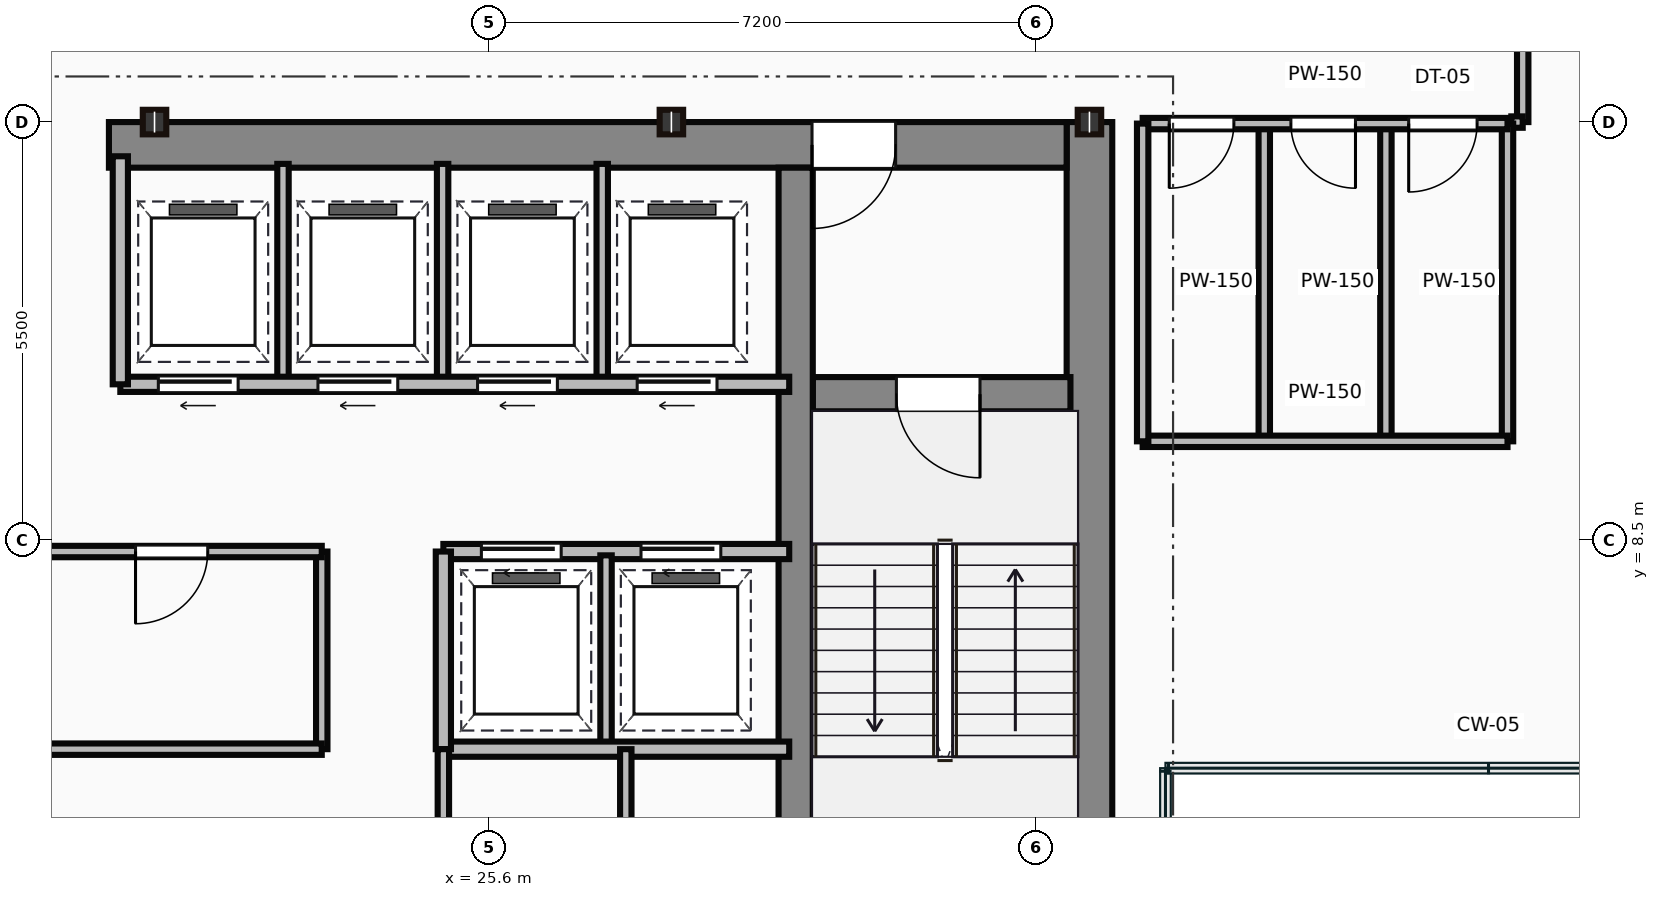
"""IFC4 building model, lengths in metres.
Left out: names, types, materials, properties, quantities, classifications, styles, units other than length and angle.
Written with IfcOpenShell. Run it as: python <this file> out.ifc"""

import sys

from ifc_helpers import new_model, si_unit, direction, frame, frame_2d, origin, origin_2d, place, context, subcontext, project, spatial, rectangle, i_section, extrude, source, transform, mapped, element, fill, save


model = new_model("IFC4")
c1 = context("Model", 3, precision=1e-05, world=origin(), true_north=direction((0.0, 1.0)))
c2 = subcontext(c1, "Body", "Model", "MODEL_VIEW")
j1 = project(units=[si_unit("LENGTHUNIT", "METRE"), si_unit("PLANEANGLEUNIT", "RADIAN")], contexts=[c1])
p1 = place(None, origin())
s1 = spatial("IfcSite", under=j1, at=p1, CompositionType="ELEMENT")
p2 = place(p1, origin())
s2 = spatial("IfcBuilding", under=s1, at=p2, CompositionType="ELEMENT")
p3 = place(p2, frame((0.0, 0.0, 240.55)))
s3 = spatial("IfcBuildingStorey", under=s2, at=p3, CompositionType="ELEMENT", Elevation=240.55)
m1 = source(origin(), c2, "Body", "SweptSolid", [
    extrude(rectangle(XDim=13.1, YDim=0.6, at=frame_2d((6.55, 0.0))), origin(), (0.0, 0.0, 1.0), 3.65),
])
p4 = place(p3, frame((33.5, 0.9, 0.0), z_axis=(0.0, 0.0, 1.0), x_axis=(0.0, 1.0, 0.0)))
e1 = element("IfcWall", 1, at=p4, inside=s3, PredefinedType="SHEAR", context=c2, shape_type="MappedRepresentation", body=[
    mapped(m1, transform((0.0, 0.0, 0.0))),
])
m2 = source(origin(), c2, "Body", "SweptSolid", [
    extrude(rectangle(XDim=12.6, YDim=0.6, at=frame_2d((6.3, 0.0))), origin(), (0.0, 0.0, 1.0), 3.65),
])
p5 = place(p3, frame((20.6, 13.7, 0.0), z_axis=(0.0, 0.0, 1.0), x_axis=(1.0, 0.0, 0.0)))
e2 = element("IfcWall", 2, at=p5, inside=s3, PredefinedType="SHEAR", context=c2, shape_type="MappedRepresentation", body=[
    mapped(m2, transform((0.0, 0.0, 0.0))),
])
p6 = place(p5, frame((9.25, 0.0, 0.0)))
e3 = element("IfcOpeningElement", 3, at=p6, cuts=e2, PredefinedType="OPENING", context=c2, shape_type="SweptSolid", body=[
    extrude(rectangle(XDim=1.1, YDim=2.15, at=frame_2d((0.55, 1.075))), frame((0.0, 0.31, 0.0), z_axis=(0.0, -1.0, 0.0), x_axis=(1.0, 0.0, 0.0)), (0.0, 0.0, 1.0), 0.62),
])
m3 = source(origin(), c2, "Body", "SweptSolid", [
    extrude(rectangle(XDim=12.5, YDim=0.45, at=frame_2d((6.25, 0.0))), origin(), (0.0, 0.0, 1.0), 3.65),
])
p7 = place(p3, frame((29.635, 0.9, 0.0), z_axis=(0.0, 0.0, 1.0), x_axis=(0.0, 1.0, 0.0)))
e4 = element("IfcWall", 4, at=p7, inside=s3, PredefinedType="SHEAR", context=c2, shape_type="MappedRepresentation", body=[
    mapped(m3, transform((0.0, 0.0, 0.0))),
])
m4 = source(origin(), c2, "Body", "SweptSolid", [
    extrude(rectangle(XDim=3.39, YDim=0.45, at=frame_2d((1.695, 0.0))), origin(), (0.0, 0.0, 1.0), 3.65),
])
p8 = place(p3, frame((29.86, 10.42, 0.0), z_axis=(0.0, 0.0, 1.0), x_axis=(1.0, 0.0, 0.0)))
e5 = element("IfcWall", 5, at=p8, inside=s3, PredefinedType="SHEAR", context=c2, shape_type="MappedRepresentation", body=[
    mapped(m4, transform((0.0, 0.0, 0.0))),
])
p9 = place(p8, frame((1.1, 0.0, 0.0)))
e6 = element("IfcOpeningElement", 6, at=p9, cuts=e5, PredefinedType="OPENING", context=c2, shape_type="SweptSolid", body=[
    extrude(rectangle(XDim=1.1, YDim=2.15, at=frame_2d((0.55, 1.075))), frame((0.0, 0.235, 0.0), z_axis=(0.0, -1.0, 0.0), x_axis=(1.0, 0.0, 0.0)), (0.0, 0.0, 1.0), 0.47),
])
m5 = source(origin(), c2, "Body", "SweptSolid", [
    extrude(i_section(OverallWidth=0.309, OverallDepth=0.323, WebThickness=0.014, FlangeThickness=0.023, at=origin_2d()), origin(), (0.0, 0.0, 1.0), 3.65),
])
for number, where, z_axis, x_axis in (
    (7, (21.2, 14.0, 0.0), (0.0, 0.0, 1.0), (1.0, 0.0, 0.0)),
    (8, (28.0, 14.0, 0.0), (0.0, 0.0, 1.0), (1.0, 0.0, 0.0)),
    (9, (33.5, 14.0, 0.0), (0.0, 0.0, 1.0), (1.0, 0.0, 0.0)),
):
    element("IfcColumn", number, at=place(p3, frame(where, z_axis=z_axis, x_axis=x_axis)), inside=s3, PredefinedType="COLUMN", context=c2, shape_type="MappedRepresentation", body=[
        mapped(m5, transform((0.0, 0.0, 0.0))),
    ])
m6 = source(origin(), c2, "Body", "SweptSolid", [
    extrude(rectangle(XDim=11.85, YDim=0.15, at=frame_2d((5.925, 0.0))), origin(), (0.0, 0.0, 1.0), 3.4),
])
p10 = place(p3, frame((11.55, 5.75, 0.0), z_axis=(0.0, 0.0, 1.0), x_axis=(1.0, 0.0, 0.0)))
e10 = element("IfcWall", 10, at=p10, inside=s3, PredefinedType="PARTITIONING", context=c2, shape_type="MappedRepresentation", body=[
    mapped(m6, transform((0.0, 0.0, 0.0))),
])
p11 = place(p3, frame((11.55, 8.35, 0.0), z_axis=(0.0, 0.0, 1.0), x_axis=(1.0, 0.0, 0.0)))
e11 = element("IfcWall", 11, at=p11, inside=s3, PredefinedType="PARTITIONING", context=c2, shape_type="MappedRepresentation", body=[
    mapped(m6, transform((0.0, 0.0, 0.0))),
])
p12 = place(p11, frame((1.1, 0.0, 0.0)))
e12 = element("IfcOpeningElement", 12, at=p12, cuts=e11, PredefinedType="OPENING", context=c2, shape_type="SweptSolid", body=[
    extrude(rectangle(XDim=0.95, YDim=2.15, at=frame_2d((0.475, 1.075))), frame((0.0, 0.085, 0.0), z_axis=(0.0, -1.0, 0.0), x_axis=(1.0, 0.0, 0.0)), (0.0, 0.0, 1.0), 0.17),
])
p13 = place(p11, frame((9.4, 0.0, 0.0)))
e13 = element("IfcOpeningElement", 13, at=p13, cuts=e11, PredefinedType="OPENING", context=c2, shape_type="SweptSolid", body=[
    extrude(rectangle(XDim=0.95, YDim=2.15, at=frame_2d((0.475, 1.075))), frame((0.0, 0.085, 0.0), z_axis=(0.0, -1.0, 0.0), x_axis=(1.0, 0.0, 0.0)), (0.0, 0.0, 1.0), 0.17),
])
m7 = source(origin(), c2, "Body", "SweptSolid", [
    extrude(rectangle(XDim=2.6, YDim=0.15, at=frame_2d((1.3, 0.0))), origin(), (0.0, 0.0, 1.0), 3.4),
])
p14 = place(p3, frame((23.4, 5.75, 0.0), z_axis=(0.0, 0.0, 1.0), x_axis=(0.0, 1.0, 0.0)))
e14 = element("IfcWall", 14, at=p14, inside=s3, PredefinedType="PARTITIONING", context=c2, shape_type="MappedRepresentation", body=[
    mapped(m7, transform((0.0, 0.0, 0.0))),
])
m8 = source(origin(), c2, "Body", "SweptSolid", [
    extrude(rectangle(XDim=8.8, YDim=0.2, at=frame_2d((4.4, 0.0))), origin(), (0.0, 0.0, 1.0), 3.4),
])
p15 = place(p3, frame((20.75, 10.55, 0.0), z_axis=(0.0, 0.0, 1.0), x_axis=(1.0, 0.0, 0.0)))
e15 = element("IfcWall", 15, at=p15, inside=s3, PredefinedType="PARTITIONING", context=c2, shape_type="MappedRepresentation", body=[
    mapped(m8, transform((0.0, 0.0, 0.0))),
])
p16 = place(p15, frame((0.5, 0.0, 0.0)))
e16 = element("IfcOpeningElement", 16, at=p16, cuts=e15, PredefinedType="OPENING", context=c2, shape_type="SweptSolid", body=[
    extrude(rectangle(XDim=1.05, YDim=2.15, at=frame_2d((0.525, 1.075))), frame((0.0, 0.11, 0.0), z_axis=(0.0, -1.0, 0.0), x_axis=(1.0, 0.0, 0.0)), (0.0, 0.0, 1.0), 0.22),
])
p17 = place(p15, frame((2.6, 0.0, 0.0)))
e17 = element("IfcOpeningElement", 17, at=p17, cuts=e15, PredefinedType="OPENING", context=c2, shape_type="SweptSolid", body=[
    extrude(rectangle(XDim=1.05, YDim=2.15, at=frame_2d((0.525, 1.075))), frame((0.0, 0.11, 0.0), z_axis=(0.0, -1.0, 0.0), x_axis=(1.0, 0.0, 0.0)), (0.0, 0.0, 1.0), 0.22),
])
p18 = place(p15, frame((4.7, 0.0, 0.0)))
e18 = element("IfcOpeningElement", 18, at=p18, cuts=e15, PredefinedType="OPENING", context=c2, shape_type="SweptSolid", body=[
    extrude(rectangle(XDim=1.05, YDim=2.15, at=frame_2d((0.525, 1.075))), frame((0.0, 0.11, 0.0), z_axis=(0.0, -1.0, 0.0), x_axis=(1.0, 0.0, 0.0)), (0.0, 0.0, 1.0), 0.22),
])
p19 = place(p15, frame((6.8, 0.0, 0.0)))
e19 = element("IfcOpeningElement", 19, at=p19, cuts=e15, PredefinedType="OPENING", context=c2, shape_type="SweptSolid", body=[
    extrude(rectangle(XDim=1.05, YDim=2.15, at=frame_2d((0.525, 1.075))), frame((0.0, 0.11, 0.0), z_axis=(0.0, -1.0, 0.0), x_axis=(1.0, 0.0, 0.0)), (0.0, 0.0, 1.0), 0.22),
])
m9 = source(origin(), c2, "Body", "SweptSolid", [
    extrude(rectangle(XDim=3.0, YDim=0.2, at=frame_2d((1.5, 0.0))), origin(), (0.0, 0.0, 1.0), 3.4),
])
p20 = place(p3, frame((20.75, 10.55, 0.0), z_axis=(0.0, 0.0, 1.0), x_axis=(0.0, 1.0, 0.0)))
e20 = element("IfcWall", 20, at=p20, inside=s3, PredefinedType="PARTITIONING", context=c2, shape_type="MappedRepresentation", body=[
    mapped(m9, transform((0.0, 0.0, 0.0))),
])
m10 = source(origin(), c2, "Body", "SweptSolid", [
    extrude(rectangle(XDim=2.85, YDim=0.15, at=frame_2d((1.425, 0.0))), origin(), (0.0, 0.0, 1.0), 3.4),
])
for number, where, z_axis, x_axis in (
    (21, (22.89, 10.6, 0.0), (0.0, 0.0, 1.0), (0.0, 1.0, 0.0)),
    (22, (24.99, 10.6, 0.0), (0.0, 0.0, 1.0), (0.0, 1.0, 0.0)),
    (23, (27.09, 10.6, 0.0), (0.0, 0.0, 1.0), (0.0, 1.0, 0.0)),
):
    element("IfcWall", number, at=place(p3, frame(where, z_axis=z_axis, x_axis=x_axis)), inside=s3, PredefinedType="PARTITIONING", context=c2, shape_type="MappedRepresentation", body=[
        mapped(m10, transform((0.0, 0.0, 0.0))),
    ])
m11 = source(origin(), c2, "Body", "SweptSolid", [
    extrude(rectangle(XDim=4.55, YDim=0.2, at=frame_2d((2.275, 0.0))), origin(), (0.0, 0.0, 1.0), 3.4),
])
p21 = place(p3, frame((25.0, 8.35, 0.0), z_axis=(0.0, 0.0, 1.0), x_axis=(1.0, 0.0, 0.0)))
e24 = element("IfcWall", 24, at=p21, inside=s3, PredefinedType="PARTITIONING", context=c2, shape_type="MappedRepresentation", body=[
    mapped(m11, transform((0.0, 0.0, 0.0))),
])
p22 = place(p21, frame((0.5, 0.0, 0.0)))
e25 = element("IfcOpeningElement", 25, at=p22, cuts=e24, PredefinedType="OPENING", context=c2, shape_type="SweptSolid", body=[
    extrude(rectangle(XDim=1.05, YDim=2.15, at=frame_2d((0.525, 1.075))), frame((0.0, 0.11, 0.0), z_axis=(0.0, -1.0, 0.0), x_axis=(1.0, 0.0, 0.0)), (0.0, 0.0, 1.0), 0.22),
])
p23 = place(p21, frame((2.6, 0.0, 0.0)))
e26 = element("IfcOpeningElement", 26, at=p23, cuts=e24, PredefinedType="OPENING", context=c2, shape_type="SweptSolid", body=[
    extrude(rectangle(XDim=1.05, YDim=2.15, at=frame_2d((0.525, 1.075))), frame((0.0, 0.11, 0.0), z_axis=(0.0, -1.0, 0.0), x_axis=(1.0, 0.0, 0.0)), (0.0, 0.0, 1.0), 0.22),
])
p24 = place(p3, frame((25.0, 5.75, 0.0), z_axis=(0.0, 0.0, 1.0), x_axis=(1.0, 0.0, 0.0)))
e27 = element("IfcWall", 27, at=p24, inside=s3, PredefinedType="PARTITIONING", context=c2, shape_type="MappedRepresentation", body=[
    mapped(m11, transform((0.0, 0.0, 0.0))),
])
m12 = source(origin(), c2, "Body", "SweptSolid", [
    extrude(rectangle(XDim=2.6, YDim=0.2, at=frame_2d((1.3, 0.0))), origin(), (0.0, 0.0, 1.0), 3.4),
])
p25 = place(p3, frame((25.0, 5.75, 0.0), z_axis=(0.0, 0.0, 1.0), x_axis=(0.0, 1.0, 0.0)))
e28 = element("IfcWall", 28, at=p25, inside=s3, PredefinedType="PARTITIONING", context=c2, shape_type="MappedRepresentation", body=[
    mapped(m12, transform((0.0, 0.0, 0.0))),
])
m13 = source(origin(), c2, "Body", "SweptSolid", [
    extrude(rectangle(XDim=2.5, YDim=0.15, at=frame_2d((1.25, 0.0))), origin(), (0.0, 0.0, 1.0), 3.4),
])
p26 = place(p3, frame((27.14, 5.8, 0.0), z_axis=(0.0, 0.0, 1.0), x_axis=(0.0, 1.0, 0.0)))
e29 = element("IfcWall", 29, at=p26, inside=s3, PredefinedType="PARTITIONING", context=c2, shape_type="MappedRepresentation", body=[
    mapped(m13, transform((0.0, 0.0, 0.0))),
])
m14 = source(origin(), c2, "Body", "SweptSolid", [
    extrude(rectangle(XDim=4.9, YDim=0.15, at=frame_2d((2.45, 0.0))), origin(), (0.0, 0.0, 1.0), 3.4),
])
p27 = place(p3, frame((25.0, 0.85, 0.0), z_axis=(0.0, 0.0, 1.0), x_axis=(0.0, 1.0, 0.0)))
e30 = element("IfcWall", 30, at=p27, inside=s3, PredefinedType="PARTITIONING", context=c2, shape_type="MappedRepresentation", body=[
    mapped(m14, transform((0.0, 0.0, 0.0))),
])
p28 = place(p27, frame((2.5, 0.0, 0.0)))
e31 = element("IfcOpeningElement", 31, at=p28, cuts=e30, PredefinedType="OPENING", context=c2, shape_type="SweptSolid", body=[
    extrude(rectangle(XDim=0.95, YDim=2.15, at=frame_2d((0.475, 1.075))), frame((0.0, 0.085, 0.0), z_axis=(0.0, -1.0, 0.0), x_axis=(1.0, 0.0, 0.0)), (0.0, 0.0, 1.0), 0.17),
])
m15 = source(origin(), c2, "Body", "SweptSolid", [
    extrude(rectangle(XDim=3.4, YDim=0.15, at=frame_2d((1.7, 0.0))), origin(), (0.0, 0.0, 1.0), 3.4),
])
p29 = place(p3, frame((27.4, 2.35, 0.0), z_axis=(0.0, 0.0, 1.0), x_axis=(0.0, 1.0, 0.0)))
e32 = element("IfcWall", 32, at=p29, inside=s3, PredefinedType="PARTITIONING", context=c2, shape_type="MappedRepresentation", body=[
    mapped(m15, transform((0.0, 0.0, 0.0))),
])
p30 = place(p29, frame((1.1, 0.0, 0.0)))
e33 = element("IfcOpeningElement", 33, at=p30, cuts=e32, PredefinedType="OPENING", context=c2, shape_type="SweptSolid", body=[
    extrude(rectangle(XDim=0.85, YDim=2.1, at=frame_2d((0.425, 1.05))), frame((0.0, 0.085, 0.0), z_axis=(0.0, -1.0, 0.0), x_axis=(1.0, 0.0, 0.0)), (0.0, 0.0, 1.0), 0.17),
])
m16 = source(origin(), c2, "Body", "SweptSolid", [
    extrude(rectangle(XDim=4.8, YDim=0.15, at=frame_2d((2.4, 0.0))), origin(), (0.0, 0.0, 1.0), 2.787),
])
p31 = place(p3, frame((34.2, 13.98, 0.0), z_axis=(0.0, 0.0, 1.0), x_axis=(1.0, 0.0, 0.0)))
e34 = element("IfcWall", 34, at=p31, inside=s3, PredefinedType="PARTITIONING", context=c2, shape_type="MappedRepresentation", body=[
    mapped(m16, transform((0.0, 0.0, 0.0))),
])
p32 = place(p31, frame((0.35, 0.0, 0.0)))
e35 = element("IfcOpeningElement", 35, at=p32, cuts=e34, PredefinedType="OPENING", context=c2, shape_type="SweptSolid", body=[
    extrude(rectangle(XDim=0.85, YDim=2.1, at=frame_2d((0.425, 1.05))), frame((0.0, 0.085, 0.0), z_axis=(0.0, -1.0, 0.0), x_axis=(1.0, 0.0, 0.0)), (0.0, 0.0, 1.0), 0.17),
])
p33 = place(p31, frame((1.95, 0.0, 0.0)))
e36 = element("IfcOpeningElement", 36, at=p33, cuts=e34, PredefinedType="OPENING", context=c2, shape_type="SweptSolid", body=[
    extrude(rectangle(XDim=0.85, YDim=2.1, at=frame_2d((0.425, 1.05))), frame((0.0, 0.085, 0.0), z_axis=(0.0, -1.0, 0.0), x_axis=(1.0, 0.0, 0.0)), (0.0, 0.0, 1.0), 0.17),
])
p34 = place(p31, frame((3.5, 0.0, 0.0)))
e37 = element("IfcOpeningElement", 37, at=p34, cuts=e34, PredefinedType="OPENING", context=c2, shape_type="SweptSolid", body=[
    extrude(rectangle(XDim=0.9, YDim=2.1, at=frame_2d((0.45, 1.05))), frame((0.0, 0.085, 0.0), z_axis=(0.0, -1.0, 0.0), x_axis=(1.0, 0.0, 0.0)), (0.0, 0.0, 1.0), 0.17),
])
m17 = source(origin(), c2, "Body", "SweptSolid", [
    extrude(rectangle(XDim=4.8, YDim=0.15, at=frame_2d((2.4, 0.0))), origin(), (0.0, 0.0, 1.0), 3.4),
])
p35 = place(p3, frame((34.2, 9.8, 0.0), z_axis=(0.0, 0.0, 1.0), x_axis=(1.0, 0.0, 0.0)))
e38 = element("IfcWall", 38, at=p35, inside=s3, PredefinedType="PARTITIONING", context=c2, shape_type="MappedRepresentation", body=[
    mapped(m17, transform((0.0, 0.0, 0.0))),
])
m18 = source(origin(), c2, "Body", "SweptSolid", [
    extrude(rectangle(XDim=4.18, YDim=0.15, at=frame_2d((2.09, 0.0))), origin(), (0.0, 0.0, 1.0), 3.4),
])
for number, where, z_axis, x_axis in (
    (39, (39.0, 9.8, 0.0), (0.0, 0.0, 1.0), (0.0, 1.0, 0.0)),
    (40, (34.2, 9.8, 0.0), (0.0, 0.0, 1.0), (0.0, 1.0, 0.0)),
    (41, (35.8, 9.8, 0.0), (0.0, 0.0, 1.0), (0.0, 1.0, 0.0)),
    (42, (37.4, 9.8, 0.0), (0.0, 0.0, 1.0), (0.0, 1.0, 0.0)),
):
    element("IfcWall", number, at=place(p3, frame(where, z_axis=z_axis, x_axis=x_axis)), inside=s3, PredefinedType="PARTITIONING", context=c2, shape_type="MappedRepresentation", body=[
        mapped(m18, transform((0.0, 0.0, 0.0))),
    ])
m19 = source(origin(), c2, "Body", "SweptSolid", [
    extrude(rectangle(XDim=2.2, YDim=0.15, at=frame_2d((1.1, 0.0))), origin(), (0.0, 0.0, 1.0), 3.4),
])
p36 = place(p3, frame((39.2, 16.2, 0.0), z_axis=(0.0, 0.0, 1.0), x_axis=(0.0, -1.0, 0.0)))
e43 = element("IfcWall", 43, at=p36, inside=s3, PredefinedType="PARTITIONING", context=c2, shape_type="MappedRepresentation", body=[
    mapped(m19, transform((0.0, 0.0, 0.0))),
])
m20 = source(origin(), c2, "Body", "SweptSolid", [
    extrude(rectangle(XDim=0.15, YDim=0.15, at=frame_2d((0.075, 0.0))), origin(), (0.0, 0.0, 1.0), 3.4),
])
p37 = place(p3, frame((39.2, 14.0, 0.0), z_axis=(0.0, 0.0, 1.0), x_axis=(-1.0, 0.0, 0.0)))
e44 = element("IfcWall", 44, at=p37, inside=s3, PredefinedType="PARTITIONING", context=c2, shape_type="MappedRepresentation", body=[
    mapped(m20, transform((0.0, 0.0, 0.0))),
])
m21 = source(origin(), c2, "Body", "SweptSolid", [
    extrude(rectangle(XDim=1.1, YDim=2.15, at=frame_2d((0.55, 1.075))), frame((0.0, 0.025, 0.0), z_axis=(0.0, -1.0, 0.0), x_axis=(1.0, 0.0, 0.0)), (0.0, 0.0, 1.0), 0.05),
])
p38 = place(p9, frame((1.1, 0.0, 0.0), z_axis=(0.0, 0.0, 1.0), x_axis=(-1.0, 0.0, 0.0)))
e45 = element("IfcDoor", 45, at=p38, inside=s3, OperationType="SINGLE_SWING_RIGHT", PredefinedType="DOOR", context=c2, shape_type="MappedRepresentation", body=[
    mapped(m21, transform((0.0, 0.0, 0.0))),
])
fill(e6, e45)
p39 = place(p6, origin())
e46 = element("IfcDoor", 46, at=p39, inside=s3, OperationType="SINGLE_SWING_LEFT", PredefinedType="DOOR", context=c2, shape_type="MappedRepresentation", body=[
    mapped(m21, transform((0.0, 0.0, 0.0))),
])
fill(e3, e46)
m22 = source(origin(), c2, "Body", "SweptSolid", [
    extrude(rectangle(XDim=0.95, YDim=2.15, at=frame_2d((0.475, 1.075))), frame((0.0, 0.025, 0.0), z_axis=(0.0, -1.0, 0.0), x_axis=(1.0, 0.0, 0.0)), (0.0, 0.0, 1.0), 0.05),
])
p40 = place(p13, origin())
e47 = element("IfcDoor", 47, at=p40, inside=s3, OperationType="SINGLE_SWING_LEFT", PredefinedType="DOOR", context=c2, shape_type="MappedRepresentation", body=[
    mapped(m22, transform((0.0, 0.0, 0.0))),
])
fill(e13, e47)
m23 = source(origin(), c2, "Body", "SweptSolid", [
    extrude(rectangle(XDim=1.05, YDim=2.15, at=frame_2d((0.525, 1.075))), frame((0.0, 0.025, 0.0), z_axis=(0.0, -1.0, 0.0), x_axis=(1.0, 0.0, 0.0)), (0.0, 0.0, 1.0), 0.05),
])
p41 = place(p16, frame((1.05, 0.0, 0.0), z_axis=(0.0, 0.0, 1.0), x_axis=(-1.0, 0.0, 0.0)))
e48 = element("IfcDoor", 48, at=p41, inside=s3, OperationType="SLIDING_TO_LEFT", PredefinedType="DOOR", context=c2, shape_type="MappedRepresentation", body=[
    mapped(m23, transform((0.0, 0.0, 0.0))),
])
fill(e16, e48)
p42 = place(p17, frame((1.05, 0.0, 0.0), z_axis=(0.0, 0.0, 1.0), x_axis=(-1.0, 0.0, 0.0)))
e49 = element("IfcDoor", 49, at=p42, inside=s3, OperationType="SLIDING_TO_LEFT", PredefinedType="DOOR", context=c2, shape_type="MappedRepresentation", body=[
    mapped(m23, transform((0.0, 0.0, 0.0))),
])
fill(e17, e49)
p43 = place(p18, frame((1.05, 0.0, 0.0), z_axis=(0.0, 0.0, 1.0), x_axis=(-1.0, 0.0, 0.0)))
e50 = element("IfcDoor", 50, at=p43, inside=s3, OperationType="SLIDING_TO_LEFT", PredefinedType="DOOR", context=c2, shape_type="MappedRepresentation", body=[
    mapped(m23, transform((0.0, 0.0, 0.0))),
])
fill(e18, e50)
p44 = place(p19, frame((1.05, 0.0, 0.0), z_axis=(0.0, 0.0, 1.0), x_axis=(-1.0, 0.0, 0.0)))
e51 = element("IfcDoor", 51, at=p44, inside=s3, OperationType="SLIDING_TO_LEFT", PredefinedType="DOOR", context=c2, shape_type="MappedRepresentation", body=[
    mapped(m23, transform((0.0, 0.0, 0.0))),
])
fill(e19, e51)
p45 = place(p22, origin())
e52 = element("IfcDoor", 52, at=p45, inside=s3, OperationType="SLIDING_TO_LEFT", PredefinedType="DOOR", context=c2, shape_type="MappedRepresentation", body=[
    mapped(m23, transform((0.0, 0.0, 0.0))),
])
fill(e25, e52)
p46 = place(p23, origin())
e53 = element("IfcDoor", 53, at=p46, inside=s3, OperationType="SLIDING_TO_LEFT", PredefinedType="DOOR", context=c2, shape_type="MappedRepresentation", body=[
    mapped(m23, transform((0.0, 0.0, 0.0))),
])
fill(e26, e53)
m24 = source(origin(), c2, "Body", "SweptSolid", [
    extrude(rectangle(XDim=0.85, YDim=2.1, at=frame_2d((0.425, 1.05))), frame((0.0, 0.025, 0.0), z_axis=(0.0, -1.0, 0.0), x_axis=(1.0, 0.0, 0.0)), (0.0, 0.0, 1.0), 0.05),
])
p47 = place(p32, frame((0.85, 0.0, 0.0), z_axis=(0.0, 0.0, 1.0), x_axis=(-1.0, 0.0, 0.0)))
e54 = element("IfcDoor", 54, at=p47, inside=s3, OperationType="SINGLE_SWING_LEFT", PredefinedType="DOOR", context=c2, shape_type="MappedRepresentation", body=[
    mapped(m24, transform((0.0, 0.0, 0.0))),
])
fill(e35, e54)
p48 = place(p33, frame((0.85, 0.0, 0.0), z_axis=(0.0, 0.0, 1.0), x_axis=(-1.0, 0.0, 0.0)))
e55 = element("IfcDoor", 55, at=p48, inside=s3, OperationType="SINGLE_SWING_RIGHT", PredefinedType="DOOR", context=c2, shape_type="MappedRepresentation", body=[
    mapped(m24, transform((0.0, 0.0, 0.0))),
])
fill(e36, e55)
m25 = source(origin(), c2, "Body", "SweptSolid", [
    extrude(rectangle(XDim=0.9, YDim=2.1, at=frame_2d((0.45, 1.05))), frame((0.0, 0.025, 0.0), z_axis=(0.0, -1.0, 0.0), x_axis=(1.0, 0.0, 0.0)), (0.0, 0.0, 1.0), 0.05),
])
p49 = place(p34, frame((0.9, 0.0, 0.0), z_axis=(0.0, 0.0, 1.0), x_axis=(-1.0, 0.0, 0.0)))
e56 = element("IfcDoor", 56, at=p49, inside=s3, OperationType="SINGLE_SWING_LEFT", PredefinedType="DOOR", context=c2, shape_type="MappedRepresentation", body=[
    mapped(m25, transform((0.0, 0.0, 0.0))),
])
fill(e37, e56)
save(model, sys.argv[1])
